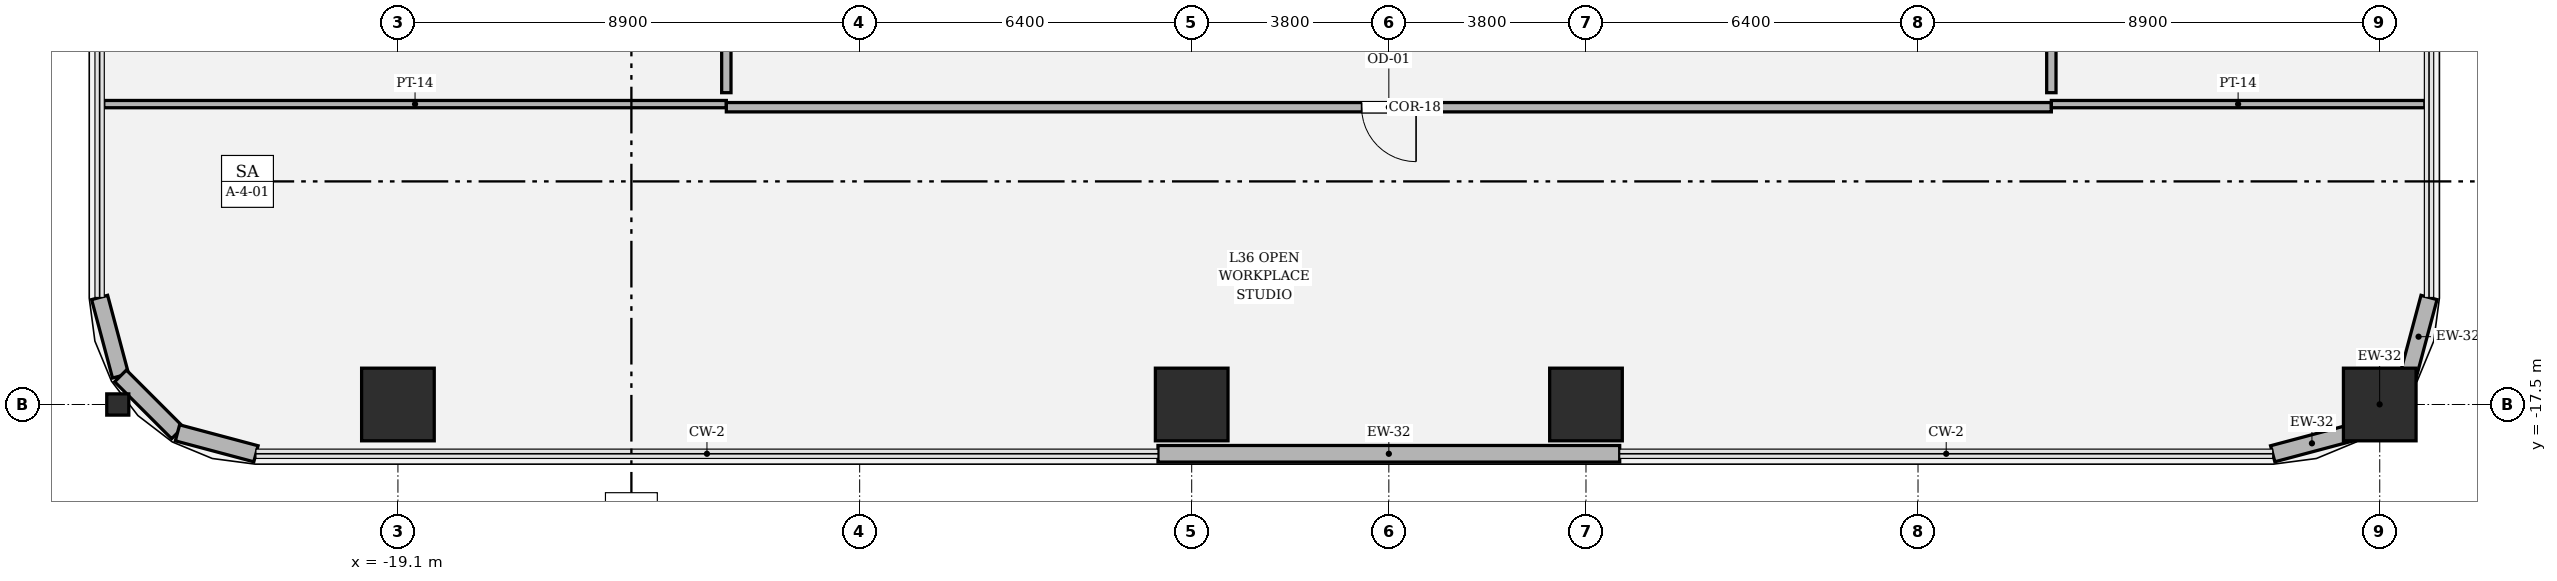
"""IFC4 building model, lengths in metres.
Left out: names, types, materials, properties, quantities, classifications, styles, units other than length and angle.
Written with IfcOpenShell. Run it as: python <this file> out.ifc"""

import sys

from ifc_helpers import new_model, si_unit, direction, frame, frame_2d, origin, origin_2d, place, context, subcontext, project, spatial, rectangle, hollow_rectangle, i_section, extrude, element, fill, save


model = new_model("IFC4")
c1 = context("Model", 3, precision=1e-05, world=origin(), true_north=direction((0.0, 1.0)))
c2 = subcontext(c1, "Body", "Model", "MODEL_VIEW")
j1 = project(units=[si_unit("LENGTHUNIT", "METRE"), si_unit("PLANEANGLEUNIT", "RADIAN")], contexts=[c1])
p1 = place(None, origin())
s1 = spatial("IfcSite", under=j1, at=p1, CompositionType="ELEMENT")
p2 = place(p1, origin())
s2 = spatial("IfcBuilding", under=s1, at=p2, CompositionType="ELEMENT")
p3 = place(p2, frame((0.0, 0.0, 156.0)))
s3 = spatial("IfcBuildingStorey", under=s2, at=p3, CompositionType="ELEMENT", Elevation=156.0)
for number, where, z_axis, x_axis in (
    (1, (-19.1, -17.5, 0.0), (0.0, 0.0, 1.0), (1.0, 0.0, 0.0)),
    (2, (-3.8, -17.5, 0.0), (0.0, 0.0, 1.0), (1.0, 0.0, 0.0)),
    (3, (3.8, -17.5, 0.0), (0.0, 0.0, 1.0), (1.0, 0.0, 0.0)),
    (4, (19.1, -17.5, 0.0), (0.0, 0.0, 1.0), (1.0, 0.0, 0.0)),
):
    element("IfcColumn", number, at=place(p3, frame(where, z_axis=z_axis, x_axis=x_axis)), inside=s3, PredefinedType="COLUMN", context=c2, shape_type="SweptSolid", body=[
        extrude(hollow_rectangle(XDim=1.4, YDim=1.4, WallThickness=0.042, at=origin_2d()), origin(), (0.0, 0.0, 1.0), 4.05),
    ])
p4 = place(p3, frame((-24.5, -17.5, 0.0), z_axis=(0.0, 0.0, 1.0), x_axis=(0.0, 1.0, 0.0)))
e5 = element("IfcColumn", 5, at=p4, inside=s3, PredefinedType="COLUMN", context=c2, shape_type="SweptSolid", body=[
    extrude(i_section(OverallWidth=0.409, OverallDepth=0.425, WebThickness=0.032, FlangeThickness=0.052, FilletRadius=0.018, at=origin_2d()), origin(), (0.0, 0.0, 1.0), 4.048),
])
p5 = place(p3, frame((-4.45, -18.45, 0.0), z_axis=(0.0, 0.0, 1.0), x_axis=(1.0, 0.0, 0.0)))
e6 = element("IfcWall", 6, at=p5, inside=s3, PredefinedType="SOLIDWALL", context=c2, shape_type="SweptSolid", body=[
    extrude(rectangle(XDim=8.9, YDim=0.32, at=frame_2d((4.45, 0.0))), origin(), (0.0, 0.0, 1.0), 3.83),
])
p6 = place(p3, frame((17.037, -18.45, 0.0), z_axis=(0.0, 0.0, 1.0), x_axis=(0.966224582397, 0.257701486942, 0.0)))
e7 = element("IfcWall", 7, at=p6, inside=s3, PredefinedType="SOLIDWALL", context=c2, shape_type="SweptSolid", body=[
    extrude(rectangle(XDim=1.565, YDim=0.32, at=frame_2d((0.783, 0.0))), origin(), (0.0, 0.0, 1.0), 3.83),
])
p7 = place(p3, frame((18.549, -18.047, 0.0), z_axis=(0.0, 0.0, 1.0), x_axis=(0.707106781187, 0.707106781187, 0.0)))
e8 = element("IfcWall", 8, at=p7, inside=s3, PredefinedType="SOLIDWALL", context=c2, shape_type="SweptSolid", body=[
    extrude(rectangle(XDim=1.552, YDim=0.32, at=frame_2d((0.776, 0.0))), origin(), (0.0, 0.0, 1.0), 3.174),
])
p8 = place(p3, frame((19.646, -16.949, 0.0), z_axis=(0.0, 0.0, 1.0), x_axis=(0.257847112249, 0.966185730957, 0.0)))
e9 = element("IfcWall", 9, at=p8, inside=s3, PredefinedType="SOLIDWALL", context=c2, shape_type="SweptSolid", body=[
    extrude(rectangle(XDim=1.565, YDim=0.32, at=frame_2d((0.783, 0.0))), origin(), (0.0, 0.0, 1.0), 3.83),
])
p9 = place(p3, frame((-24.85, -15.437, 0.0), z_axis=(0.0, 0.0, 1.0), x_axis=(0.257847112249, -0.966185730957, 0.0)))
e10 = element("IfcWall", 10, at=p9, inside=s3, PredefinedType="SOLIDWALL", context=c2, shape_type="SweptSolid", body=[
    extrude(rectangle(XDim=1.565, YDim=0.32, at=frame_2d((0.783, 0.0))), origin(), (0.0, 0.0, 1.0), 2.544),
])
p10 = place(p3, frame((-24.447, -16.949, 0.0), z_axis=(0.0, 0.0, 1.0), x_axis=(0.707106781187, -0.707106781187, 0.0)))
e11 = element("IfcWall", 11, at=p10, inside=s3, PredefinedType="SOLIDWALL", context=c2, shape_type="SweptSolid", body=[
    extrude(rectangle(XDim=1.552, YDim=0.32, at=frame_2d((0.776, 0.0))), origin(), (0.0, 0.0, 1.0), 2.504),
])
p11 = place(p3, frame((-23.349, -18.047, 0.0), z_axis=(0.0, 0.0, 1.0), x_axis=(0.966224582397, -0.257701486942, 0.0)))
e12 = element("IfcWall", 12, at=p11, inside=s3, PredefinedType="SOLIDWALL", context=c2, shape_type="SweptSolid", body=[
    extrude(rectangle(XDim=1.565, YDim=0.32, at=frame_2d((0.783, 0.0))), origin(), (0.0, 0.0, 1.0), 3.83),
])
p12 = place(p3, frame((-24.77, -11.71, 0.0), z_axis=(0.0, 0.0, 1.0), x_axis=(1.0, 0.0, 0.0)))
e13 = element("IfcWall", 13, at=p12, inside=s3, PredefinedType="PARTITIONING", context=c2, shape_type="SweptSolid", body=[
    extrude(rectangle(XDim=12.0, YDim=0.14, at=frame_2d((6.0, 0.0))), origin(), (0.0, 0.0, 1.0), 2.544),
])
p13 = place(p3, frame((-12.77, -11.77, 0.0), z_axis=(0.0, 0.0, 1.0), x_axis=(1.0, 0.0, 0.0)))
e14 = element("IfcWall", 14, at=p13, inside=s3, PredefinedType="PARTITIONING", context=c2, shape_type="SweptSolid", body=[
    extrude(rectangle(XDim=25.54, YDim=0.18, at=frame_2d((12.77, 0.0))), origin(), (0.0, 0.0, 1.0), 3.174),
])
p14 = place(p13, frame((12.245, 0.0, 0.0)))
e15 = element("IfcOpeningElement", 15, at=p14, cuts=e14, PredefinedType="OPENING", context=c2, shape_type="SweptSolid", body=[
    extrude(rectangle(XDim=1.05, YDim=2.2, at=frame_2d((0.525, 1.1))), frame((0.0, 0.1, 0.0), z_axis=(0.0, -1.0, 0.0), x_axis=(1.0, 0.0, 0.0)), (0.0, 0.0, 1.0), 0.2),
])
p15 = place(p3, frame((12.77, -11.71, 0.0), z_axis=(0.0, 0.0, 1.0), x_axis=(1.0, 0.0, 0.0)))
e16 = element("IfcWall", 16, at=p15, inside=s3, PredefinedType="PARTITIONING", context=c2, shape_type="SweptSolid", body=[
    extrude(rectangle(XDim=7.2, YDim=0.14, at=frame_2d((3.6, 0.0))), origin(), (0.0, 0.0, 1.0), 3.174),
])
p16 = place(p3, frame((12.77, -11.49, 0.0), z_axis=(0.0, 0.0, 1.0), x_axis=(0.0, 1.0, 0.0)))
e17 = element("IfcWall", 17, at=p16, inside=s3, PredefinedType="PARTITIONING", context=c2, shape_type="SweptSolid", body=[
    extrude(rectangle(XDim=10.29, YDim=0.18, at=frame_2d((5.145, 0.0))), origin(), (0.0, 0.0, 1.0), 3.174),
])
p17 = place(p3, frame((-12.77, 1.88, 0.0), z_axis=(0.0, 0.0, 1.0), x_axis=(0.0, -1.0, 0.0)))
e18 = element("IfcWall", 18, at=p17, inside=s3, PredefinedType="PARTITIONING", context=c2, shape_type="SweptSolid", body=[
    extrude(rectangle(XDim=13.37, YDim=0.18, at=frame_2d((6.685, 0.0))), origin(), (0.0, 0.0, 1.0), 3.174),
])
p18 = place(p17, frame((6.16, 0.0, 0.0)))
e19 = element("IfcOpeningElement", 19, at=p18, cuts=e18, PredefinedType="OPENING", context=c2, shape_type="SweptSolid", body=[
    extrude(rectangle(XDim=1.05, YDim=2.2, at=frame_2d((0.525, 1.1))), frame((0.0, 0.1, 0.0), z_axis=(0.0, -1.0, 0.0), x_axis=(1.0, 0.0, 0.0)), (0.0, 0.0, 1.0), 0.2),
])
p19 = place(p14, origin())
e20 = element("IfcDoor", 20, at=p19, inside=s3, OperationType="SINGLE_SWING_RIGHT", PredefinedType="DOOR", context=c2, shape_type="SweptSolid", body=[
    extrude(rectangle(XDim=1.05, YDim=2.2, at=frame_2d((0.525, 1.1))), frame((0.0, 0.025, 0.0), z_axis=(0.0, -1.0, 0.0), x_axis=(1.0, 0.0, 0.0)), (0.0, 0.0, 1.0), 0.05),
])
fill(e15, e20)
save(model, sys.argv[1])
